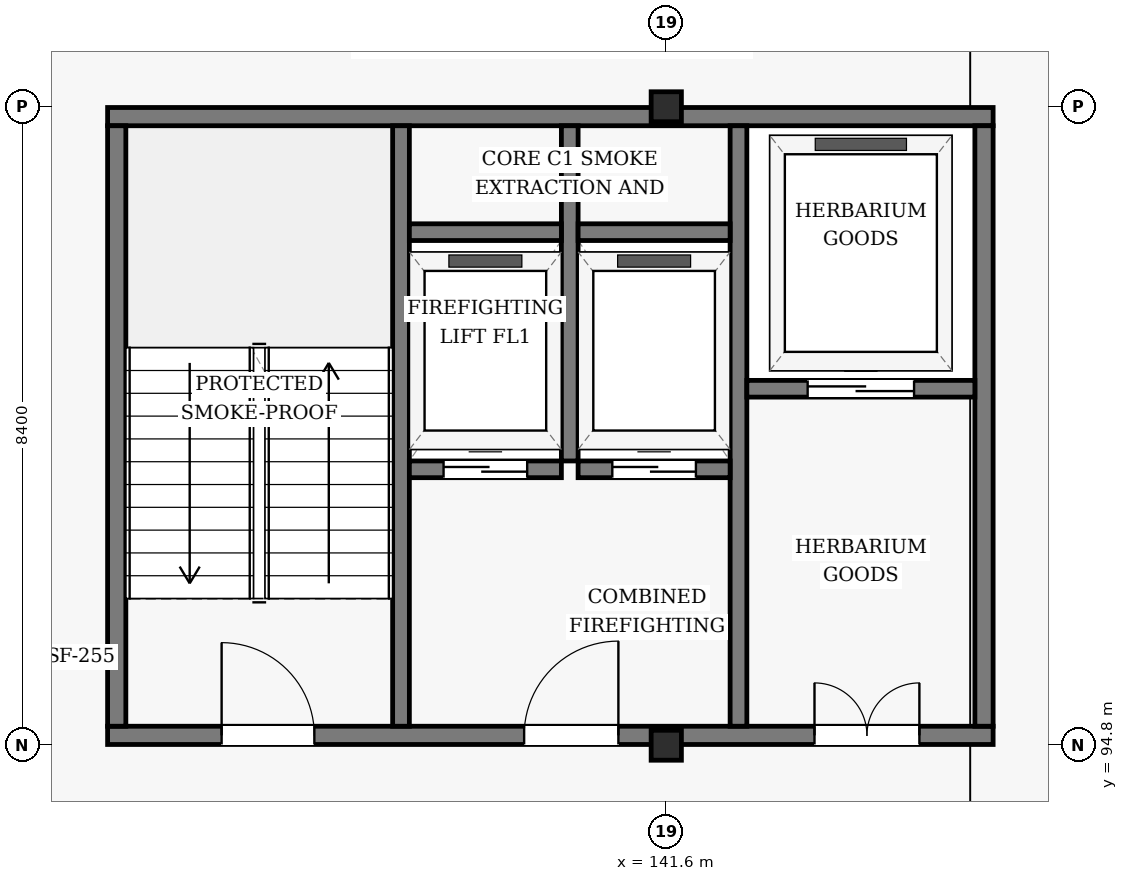
"""IFC4 building model, lengths in metres.
Left out: names, types, materials, properties, quantities, classifications, styles, units other than length and angle.
Written with IfcOpenShell. Run it as: python <this file> out.ifc"""

import sys

from ifc_helpers import new_model, si_unit, direction, frame, frame_2d, origin, origin_2d, place, context, subcontext, project, spatial, rectangle, i_section, extrude, element, fill, save


model = new_model("IFC4")
c1 = context("Model", 3, precision=1e-05, world=origin(), true_north=direction((0.0, 1.0)))
c2 = subcontext(c1, "Body", "Model", "MODEL_VIEW")
j1 = project(units=[si_unit("LENGTHUNIT", "METRE"), si_unit("PLANEANGLEUNIT", "RADIAN")], contexts=[c1])
p1 = place(None, origin())
s1 = spatial("IfcSite", under=j1, at=p1, CompositionType="ELEMENT")
p2 = place(p1, origin())
s2 = spatial("IfcBuilding", under=s1, at=p2, CompositionType="ELEMENT")
p3 = place(p2, frame((0.0, 0.0, 28.2)))
s3 = spatial("IfcBuildingStorey", under=s2, at=p3, CompositionType="ELEMENT", Elevation=28.2)
for number, where, z_axis, x_axis in (
    (1, (141.6, 94.8, 0.0), (0.0, 0.0, 1.0), (1.0, 0.0, 0.0)),
    (2, (141.6, 103.2, 0.0), (0.0, 0.0, 1.0), (1.0, 0.0, 0.0)),
):
    element("IfcColumn", number, at=place(p3, frame(where, z_axis=z_axis, x_axis=x_axis)), inside=s3, PredefinedType="COLUMN", context=c2, shape_type="SweptSolid", body=[
        extrude(i_section(OverallWidth=0.398, OverallDepth=0.394, WebThickness=0.011, FlangeThickness=0.018, FilletRadius=0.022, at=origin_2d()), origin(), (0.0, 0.0, 1.0), 3.6),
    ])
p4 = place(p3, frame((134.25, 94.93, 0.0), z_axis=(0.0, 0.0, 1.0), x_axis=(1.0, 0.0, 0.0)))
e3 = element("IfcWall", 3, at=p4, inside=s3, PredefinedType="SHEAR", context=c2, shape_type="SweptSolid", body=[
    extrude(rectangle(XDim=11.65, YDim=0.24, at=frame_2d((5.825, 0.0))), origin(), (0.0, 0.0, 1.0), 3.352),
])
p5 = place(p4, frame((1.5, 0.0, 0.0)))
e4 = element("IfcOpeningElement", 4, at=p5, cuts=e3, PredefinedType="OPENING", context=c2, shape_type="SweptSolid", body=[
    extrude(rectangle(XDim=1.22, YDim=2.18, at=frame_2d((0.61, 1.09))), frame((0.0, 0.13, 0.0), z_axis=(0.0, -1.0, 0.0), x_axis=(1.0, 0.0, 0.0)), (0.0, 0.0, 1.0), 0.26),
])
p6 = place(p4, frame((5.48, 0.0, 0.0)))
e5 = element("IfcOpeningElement", 5, at=p6, cuts=e3, PredefinedType="OPENING", context=c2, shape_type="SweptSolid", body=[
    extrude(rectangle(XDim=1.24, YDim=2.15, at=frame_2d((0.62, 1.075))), frame((0.0, 0.13, 0.0), z_axis=(0.0, -1.0, 0.0), x_axis=(1.0, 0.0, 0.0)), (0.0, 0.0, 1.0), 0.26),
])
p7 = place(p4, frame((9.3, 0.0, 0.0)))
e6 = element("IfcOpeningElement", 6, at=p7, cuts=e3, PredefinedType="OPENING", context=c2, shape_type="SweptSolid", body=[
    extrude(rectangle(XDim=1.38, YDim=2.15, at=frame_2d((0.69, 1.075))), frame((0.0, 0.13, 0.0), z_axis=(0.0, -1.0, 0.0), x_axis=(1.0, 0.0, 0.0)), (0.0, 0.0, 1.0), 0.26),
])
p8 = place(p3, frame((134.25, 103.07, 0.0), z_axis=(0.0, 0.0, 1.0), x_axis=(1.0, 0.0, 0.0)))
e7 = element("IfcWall", 7, at=p8, inside=s3, PredefinedType="SHEAR", context=c2, shape_type="SweptSolid", body=[
    extrude(rectangle(XDim=11.65, YDim=0.24, at=frame_2d((5.825, 0.0))), origin(), (0.0, 0.0, 1.0), 3.352),
])
p9 = place(p3, frame((134.37, 95.05, 0.0), z_axis=(0.0, 0.0, 1.0), x_axis=(0.0, 1.0, 0.0)))
e8 = element("IfcWall", 8, at=p9, inside=s3, PredefinedType="SHEAR", context=c2, shape_type="SweptSolid", body=[
    extrude(rectangle(XDim=7.9, YDim=0.24, at=frame_2d((3.95, 0.0))), origin(), (0.0, 0.0, 1.0), 3.352),
])
p10 = place(p3, frame((138.11, 95.05, 0.0), z_axis=(0.0, 0.0, 1.0), x_axis=(0.0, 1.0, 0.0)))
e9 = element("IfcWall", 9, at=p10, inside=s3, PredefinedType="SHEAR", context=c2, shape_type="SweptSolid", body=[
    extrude(rectangle(XDim=7.9, YDim=0.22, at=frame_2d((3.95, 0.0))), origin(), (0.0, 0.0, 1.0), 3.352),
])
p11 = place(p3, frame((140.33, 98.54, 0.0), z_axis=(0.0, 0.0, 1.0), x_axis=(0.0, 1.0, 0.0)))
e10 = element("IfcWall", 10, at=p11, inside=s3, PredefinedType="SHEAR", context=c2, shape_type="SweptSolid", body=[
    extrude(rectangle(XDim=4.41, YDim=0.22, at=frame_2d((2.205, 0.0))), origin(), (0.0, 0.0, 1.0), 3.352),
])
p12 = place(p3, frame((142.55, 95.05, 0.0), z_axis=(0.0, 0.0, 1.0), x_axis=(0.0, 1.0, 0.0)))
e11 = element("IfcWall", 11, at=p12, inside=s3, PredefinedType="SHEAR", context=c2, shape_type="SweptSolid", body=[
    extrude(rectangle(XDim=7.9, YDim=0.22, at=frame_2d((3.95, 0.0))), origin(), (0.0, 0.0, 1.0), 3.352),
])
p13 = place(p3, frame((145.78, 95.05, 0.0), z_axis=(0.0, 0.0, 1.0), x_axis=(0.0, 1.0, 0.0)))
e12 = element("IfcWall", 12, at=p13, inside=s3, PredefinedType="SHEAR", context=c2, shape_type="SweptSolid", body=[
    extrude(rectangle(XDim=7.9, YDim=0.24, at=frame_2d((3.95, 0.0))), origin(), (0.0, 0.0, 1.0), 3.352),
])
p14 = place(p3, frame((138.22, 98.43, 0.0), z_axis=(0.0, 0.0, 1.0), x_axis=(1.0, 0.0, 0.0)))
e13 = element("IfcWall", 13, at=p14, inside=s3, PredefinedType="SHEAR", context=c2, shape_type="SweptSolid", body=[
    extrude(rectangle(XDim=2.0, YDim=0.22, at=frame_2d((1.0, 0.0))), origin(), (0.0, 0.0, 1.0), 3.352),
])
p15 = place(p14, frame((0.45, 0.0, 0.0)))
e14 = element("IfcOpeningElement", 14, at=p15, cuts=e13, PredefinedType="OPENING", context=c2, shape_type="SweptSolid", body=[
    extrude(rectangle(XDim=1.1, YDim=2.15, at=frame_2d((0.55, 1.075))), frame((0.0, 0.12, 0.0), z_axis=(0.0, -1.0, 0.0), x_axis=(1.0, 0.0, 0.0)), (0.0, 0.0, 1.0), 0.24),
])
p16 = place(p3, frame((140.44, 98.43, 0.0), z_axis=(0.0, 0.0, 1.0), x_axis=(1.0, 0.0, 0.0)))
e15 = element("IfcWall", 15, at=p16, inside=s3, PredefinedType="SHEAR", context=c2, shape_type="SweptSolid", body=[
    extrude(rectangle(XDim=2.0, YDim=0.22, at=frame_2d((1.0, 0.0))), origin(), (0.0, 0.0, 1.0), 3.352),
])
p17 = place(p16, frame((0.45, 0.0, 0.0)))
e16 = element("IfcOpeningElement", 16, at=p17, cuts=e15, PredefinedType="OPENING", context=c2, shape_type="SweptSolid", body=[
    extrude(rectangle(XDim=1.1, YDim=2.15, at=frame_2d((0.55, 1.075))), frame((0.0, 0.12, 0.0), z_axis=(0.0, -1.0, 0.0), x_axis=(1.0, 0.0, 0.0)), (0.0, 0.0, 1.0), 0.24),
])
for number, where, z_axis, x_axis in (
    (17, (138.22, 101.55, 0.0), (0.0, 0.0, 1.0), (1.0, 0.0, 0.0)),
    (18, (140.44, 101.55, 0.0), (0.0, 0.0, 1.0), (1.0, 0.0, 0.0)),
):
    element("IfcWall", number, at=place(p3, frame(where, z_axis=z_axis, x_axis=x_axis)), inside=s3, PredefinedType="SHEAR", context=c2, shape_type="SweptSolid", body=[
        extrude(rectangle(XDim=2.0, YDim=0.22, at=frame_2d((1.0, 0.0))), origin(), (0.0, 0.0, 1.0), 3.352),
    ])
p18 = place(p3, frame((142.66, 99.49, 0.0), z_axis=(0.0, 0.0, 1.0), x_axis=(1.0, 0.0, 0.0)))
e19 = element("IfcWall", 19, at=p18, inside=s3, PredefinedType="SHEAR", context=c2, shape_type="SweptSolid", body=[
    extrude(rectangle(XDim=3.0, YDim=0.22, at=frame_2d((1.5, 0.0))), origin(), (0.0, 0.0, 1.0), 3.352),
])
p19 = place(p18, frame((0.8, 0.0, 0.0)))
e20 = element("IfcOpeningElement", 20, at=p19, cuts=e19, PredefinedType="OPENING", context=c2, shape_type="SweptSolid", body=[
    extrude(rectangle(XDim=1.4, YDim=2.2, at=frame_2d((0.7, 1.1))), frame((0.0, 0.12, 0.0), z_axis=(0.0, -1.0, 0.0), x_axis=(1.0, 0.0, 0.0)), (0.0, 0.0, 1.0), 0.24),
])
p20 = place(p5, origin())
e21 = element("IfcDoor", 21, at=p20, inside=s3, OperationType="SINGLE_SWING_LEFT", PredefinedType="DOOR", context=c2, shape_type="SweptSolid", body=[
    extrude(rectangle(XDim=1.22, YDim=2.18, at=frame_2d((0.61, 1.09))), frame((0.0, 0.025, 0.0), z_axis=(0.0, -1.0, 0.0), x_axis=(1.0, 0.0, 0.0)), (0.0, 0.0, 1.0), 0.05),
])
fill(e4, e21)
p21 = place(p6, frame((1.24, 0.0, 0.0), z_axis=(0.0, 0.0, 1.0), x_axis=(-1.0, 0.0, 0.0)))
e22 = element("IfcDoor", 22, at=p21, inside=s3, OperationType="SINGLE_SWING_RIGHT", PredefinedType="DOOR", context=c2, shape_type="SweptSolid", body=[
    extrude(rectangle(XDim=1.24, YDim=2.15, at=frame_2d((0.62, 1.075))), frame((0.0, 0.025, 0.0), z_axis=(0.0, -1.0, 0.0), x_axis=(1.0, 0.0, 0.0)), (0.0, 0.0, 1.0), 0.05),
])
fill(e5, e22)
p22 = place(p7, frame((1.38, 0.0, 0.0), z_axis=(0.0, 0.0, 1.0), x_axis=(-1.0, 0.0, 0.0)))
e23 = element("IfcDoor", 23, at=p22, inside=s3, OperationType="DOUBLE_DOOR_SINGLE_SWING", PredefinedType="DOOR", context=c2, shape_type="SweptSolid", body=[
    extrude(rectangle(XDim=1.38, YDim=2.15, at=frame_2d((0.69, 1.075))), frame((0.0, 0.025, 0.0), z_axis=(0.0, -1.0, 0.0), x_axis=(1.0, 0.0, 0.0)), (0.0, 0.0, 1.0), 0.05),
])
fill(e6, e23)
p23 = place(p15, origin())
e24 = element("IfcDoor", 24, at=p23, inside=s3, OperationType="SLIDING_TO_LEFT", PredefinedType="DOOR", context=c2, shape_type="SweptSolid", body=[
    extrude(rectangle(XDim=1.1, YDim=2.15, at=frame_2d((0.55, 1.075))), frame((0.0, 0.025, 0.0), z_axis=(0.0, -1.0, 0.0), x_axis=(1.0, 0.0, 0.0)), (0.0, 0.0, 1.0), 0.05),
])
fill(e14, e24)
p24 = place(p17, origin())
e25 = element("IfcDoor", 25, at=p24, inside=s3, OperationType="SLIDING_TO_LEFT", PredefinedType="DOOR", context=c2, shape_type="SweptSolid", body=[
    extrude(rectangle(XDim=1.1, YDim=2.15, at=frame_2d((0.55, 1.075))), frame((0.0, 0.025, 0.0), z_axis=(0.0, -1.0, 0.0), x_axis=(1.0, 0.0, 0.0)), (0.0, 0.0, 1.0), 0.05),
])
fill(e16, e25)
p25 = place(p19, origin())
e26 = element("IfcDoor", 26, at=p25, inside=s3, OperationType="SLIDING_TO_LEFT", PredefinedType="DOOR", context=c2, shape_type="SweptSolid", body=[
    extrude(rectangle(XDim=1.4, YDim=2.2, at=frame_2d((0.7, 1.1))), frame((0.0, 0.025, 0.0), z_axis=(0.0, -1.0, 0.0), x_axis=(1.0, 0.0, 0.0)), (0.0, 0.0, 1.0), 0.05),
])
fill(e20, e26)
save(model, sys.argv[1])
